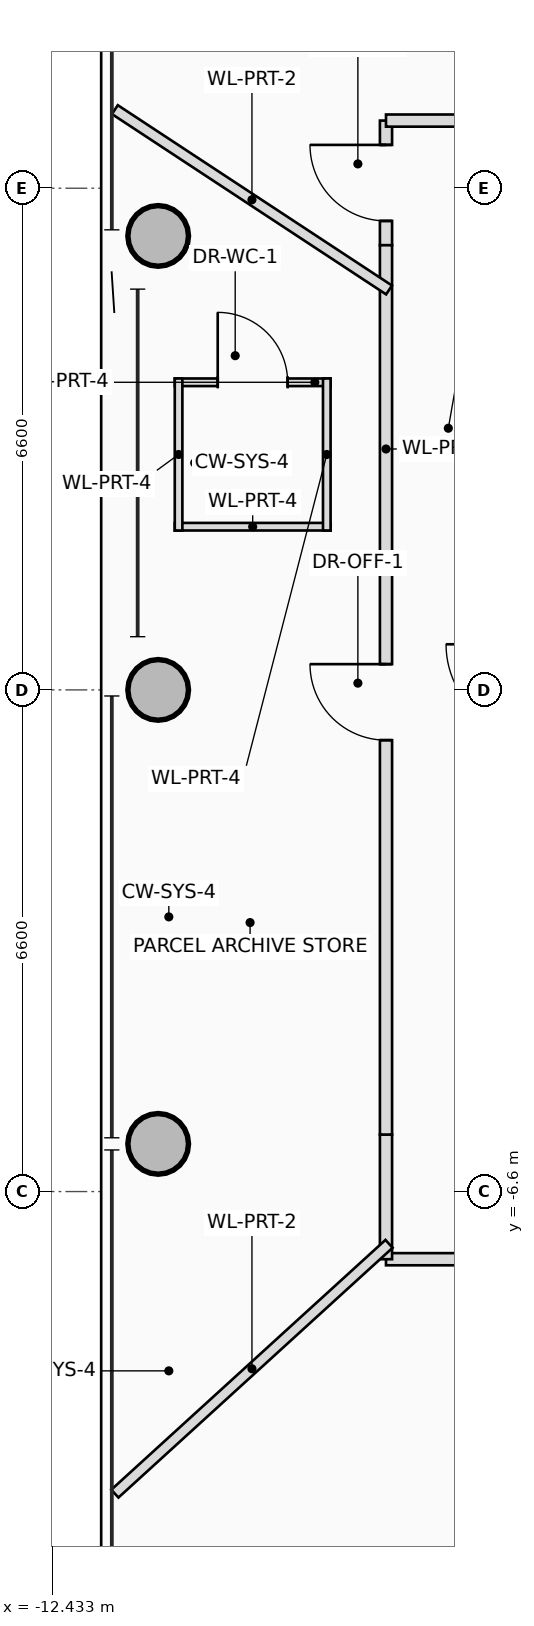
"""IFC4 building model, lengths in metres.
Left out: names, types, materials, properties, quantities, classifications, styles, units other than length and angle.
Written with IfcOpenShell. Run it as: python <this file> out.ifc"""

import sys

from ifc_helpers import new_model, si_unit, direction, frame, frame_2d, origin, origin_2d, place, context, subcontext, project, spatial, rectangle, hollow_circle, extrude, source, transform, mapped, element, fill, save


model = new_model("IFC4")
c1 = context("Model", 3, precision=1e-05, world=origin(), true_north=direction((0.0, 1.0)))
c2 = subcontext(c1, "Body", "Model", "MODEL_VIEW")
j1 = project(units=[si_unit("LENGTHUNIT", "METRE"), si_unit("PLANEANGLEUNIT", "RADIAN")], contexts=[c1])
p1 = place(None, origin())
s1 = spatial("IfcSite", under=j1, at=p1, CompositionType="ELEMENT")
p2 = place(p1, origin())
s2 = spatial("IfcBuilding", under=s1, at=p2, CompositionType="ELEMENT")
p3 = place(p2, frame((0.0, 0.0, 296.75)))
s3 = spatial("IfcBuildingStorey", under=s2, at=p3, CompositionType="ELEMENT", Elevation=296.75)
m1 = source(origin(), c2, "Body", "SweptSolid", [
    extrude(hollow_circle(Radius=0.4, WallThickness=0.028, at=origin_2d()), origin(), (0.0, 0.0, 1.0), 3.45),
])
for number, where, z_axis, x_axis in (
    (1, (-11.037, 5.973, 0.0), (0.0, 0.0, 1.0), (1.0, 0.0, 0.0)),
    (2, (-11.037, 0.0, 0.0), (0.0, 0.0, 1.0), (1.0, 0.0, 0.0)),
    (3, (-11.037, -5.973, 0.0), (0.0, 0.0, 1.0), (1.0, 0.0, 0.0)),
):
    element("IfcColumn", number, at=place(p3, frame(where, z_axis=z_axis, x_axis=x_axis)), inside=s3, PredefinedType="COLUMN", context=c2, shape_type="MappedRepresentation", body=[
        mapped(m1, transform((0.0, 0.0, 0.0), scale=1.0)),
    ])
p4 = place(p3, frame((-10.819, 4.047, 0.0), z_axis=(0.0, 0.0, 1.0), x_axis=(1.0, 0.0, 0.0)))
e4 = element("IfcWall", 4, at=p4, inside=s3, PredefinedType="PARTITIONING", context=c2, shape_type="SweptSolid", body=[
    extrude(rectangle(XDim=2.05, YDim=0.1, at=frame_2d((1.025, 0.0))), origin(), (0.0, 0.0, 1.0), 2.905),
])
p5 = place(p4, frame((0.565, 0.0, 0.0)))
e5 = element("IfcOpeningElement", 5, at=p5, cuts=e4, PredefinedType="OPENING", context=c2, shape_type="SweptSolid", body=[
    extrude(rectangle(XDim=0.92, YDim=2.1, at=frame_2d((0.46, 1.05))), frame((0.0, 0.06, 0.0), z_axis=(0.0, -1.0, 0.0), x_axis=(1.0, 0.0, 0.0)), (0.0, 0.0, 1.0), 0.12),
])
p6 = place(p3, frame((-8.769, 2.147, 0.0), z_axis=(0.0, 0.0, 1.0), x_axis=(-1.0, 0.0, 0.0)))
e6 = element("IfcWall", 6, at=p6, inside=s3, PredefinedType="PARTITIONING", context=c2, shape_type="SweptSolid", body=[
    extrude(rectangle(XDim=2.05, YDim=0.1, at=frame_2d((1.025, 0.0))), origin(), (0.0, 0.0, 1.0), 2.905),
])
for number, where, z_axis, x_axis in (
    (7, (-8.819, 4.097, 0.0), (0.0, 0.0, 1.0), (0.0, -1.0, 0.0)),
    (8, (-10.769, 2.097, 0.0), (0.0, 0.0, 1.0), (0.0, 1.0, 0.0)),
):
    element("IfcWall", number, at=place(p3, frame(where, z_axis=z_axis, x_axis=x_axis)), inside=s3, PredefinedType="PARTITIONING", context=c2, shape_type="SweptSolid", body=[
        extrude(rectangle(XDim=2.0, YDim=0.1, at=frame_2d((1.0, 0.0))), origin(), (0.0, 0.0, 1.0), 3.25),
    ])
p7 = place(p3, frame((-8.04, 5.85, 0.0), z_axis=(0.0, 0.0, 1.0), x_axis=(0.0, 1.0, 0.0)))
e9 = element("IfcWall", 9, at=p7, inside=s3, PredefinedType="PARTITIONING", context=c2, shape_type="SweptSolid", body=[
    extrude(rectangle(XDim=1.64, YDim=0.16, at=frame_2d((0.82, 0.0))), origin(), (0.0, 0.0, 1.0), 2.905),
])
p8 = place(p7, frame((0.32, 0.0, 0.0)))
e10 = element("IfcOpeningElement", 10, at=p8, cuts=e9, PredefinedType="OPENING", context=c2, shape_type="SweptSolid", body=[
    extrude(rectangle(XDim=1.0, YDim=2.25, at=frame_2d((0.5, 1.125))), frame((0.0, 0.09, 0.0), z_axis=(0.0, -1.0, 0.0), x_axis=(1.0, 0.0, 0.0)), (0.0, 0.0, 1.0), 0.18),
])
for number, where, z_axis, x_axis in (
    (11, (-8.04, 7.49, 0.0), (0.0, 0.0, 1.0), (1.0, 0.0, 0.0)),
    (12, (-6.36, -7.49, 0.0), (0.0, 0.0, 1.0), (-1.0, 0.0, 0.0)),
):
    element("IfcWall", number, at=place(p3, frame(where, z_axis=z_axis, x_axis=x_axis)), inside=s3, PredefinedType="PARTITIONING", context=c2, shape_type="SweptSolid", body=[
        extrude(rectangle(XDim=1.68, YDim=0.16, at=frame_2d((0.84, 0.0))), origin(), (0.0, 0.0, 1.0), 2.655),
    ])
p9 = place(p3, frame((-8.04, -7.49, 0.0), z_axis=(0.0, 0.0, 1.0), x_axis=(0.0, 1.0, 0.0)))
e13 = element("IfcWall", 13, at=p9, inside=s3, PredefinedType="PARTITIONING", context=c2, shape_type="SweptSolid", body=[
    extrude(rectangle(XDim=1.64, YDim=0.16, at=frame_2d((0.82, 0.0))), origin(), (0.0, 0.0, 1.0), 3.25),
])
p10 = place(p3, frame((-8.04, -5.85, 0.0), z_axis=(0.0, 0.0, 1.0), x_axis=(0.0, 1.0, 0.0)))
e14 = element("IfcWall", 14, at=p10, inside=s3, PredefinedType="PARTITIONING", context=c2, shape_type="SweptSolid", body=[
    extrude(rectangle(XDim=11.7, YDim=0.16, at=frame_2d((5.85, 0.0))), origin(), (0.0, 0.0, 1.0), 2.655),
])
p11 = place(p10, frame((5.189, 0.0, 0.0)))
e15 = element("IfcOpeningElement", 15, at=p11, cuts=e14, PredefinedType="OPENING", context=c2, shape_type="SweptSolid", body=[
    extrude(rectangle(XDim=1.0, YDim=2.25, at=frame_2d((0.5, 1.125))), frame((0.0, 0.09, 0.0), z_axis=(0.0, -1.0, 0.0), x_axis=(1.0, 0.0, 0.0)), (0.0, 0.0, 1.0), 0.18),
])
p12 = place(p3, frame((-8.0, 5.262, 0.0), z_axis=(0.0, 0.0, 1.0), x_axis=(-0.835496328285, 0.549496028578, 0.0)))
e16 = element("IfcWall", 16, at=p12, inside=s3, PredefinedType="PARTITIONING", context=c2, shape_type="SweptSolid", body=[
    extrude(rectangle(XDim=4.318, YDim=0.14, at=frame_2d((2.159, 0.0))), origin(), (0.0, 0.0, 1.0), 2.655),
])
p13 = place(p3, frame((-8.0, -7.288, 0.0), z_axis=(0.0, 0.0, 1.0), x_axis=(-0.739260540131, -0.673419522886, 0.0)))
e17 = element("IfcWall", 17, at=p13, inside=s3, PredefinedType="PARTITIONING", context=c2, shape_type="SweptSolid", body=[
    extrude(rectangle(XDim=4.88, YDim=0.14, at=frame_2d((2.44, 0.0))), origin(), (0.0, 0.0, 1.0), 2.815),
])
p14 = place(p5, origin())
e18 = element("IfcDoor", 18, at=p14, inside=s3, OperationType="SINGLE_SWING_LEFT", PredefinedType="DOOR", context=c2, shape_type="SweptSolid", body=[
    extrude(rectangle(XDim=0.92, YDim=2.1, at=frame_2d((0.46, 1.05))), frame((0.0, 0.025, 0.0), z_axis=(0.0, -1.0, 0.0), x_axis=(1.0, 0.0, 0.0)), (0.0, 0.0, 1.0), 0.05),
])
fill(e5, e18)
p15 = place(p8, origin())
e19 = element("IfcDoor", 19, at=p15, inside=s3, OperationType="SINGLE_SWING_RIGHT", PredefinedType="DOOR", context=c2, shape_type="SweptSolid", body=[
    extrude(rectangle(XDim=1.0, YDim=2.25, at=frame_2d((0.5, 1.125))), frame((0.0, 0.025, 0.0), z_axis=(0.0, -1.0, 0.0), x_axis=(1.0, 0.0, 0.0)), (0.0, 0.0, 1.0), 0.05),
])
fill(e10, e19)
p16 = place(p11, origin())
e20 = element("IfcDoor", 20, at=p16, inside=s3, OperationType="SINGLE_SWING_RIGHT", PredefinedType="DOOR", context=c2, shape_type="SweptSolid", body=[
    extrude(rectangle(XDim=1.0, YDim=2.25, at=frame_2d((0.5, 1.125))), frame((0.0, 0.025, 0.0), z_axis=(0.0, -1.0, 0.0), x_axis=(1.0, 0.0, 0.0)), (0.0, 0.0, 1.0), 0.05),
])
fill(e15, e20)
save(model, sys.argv[1])
